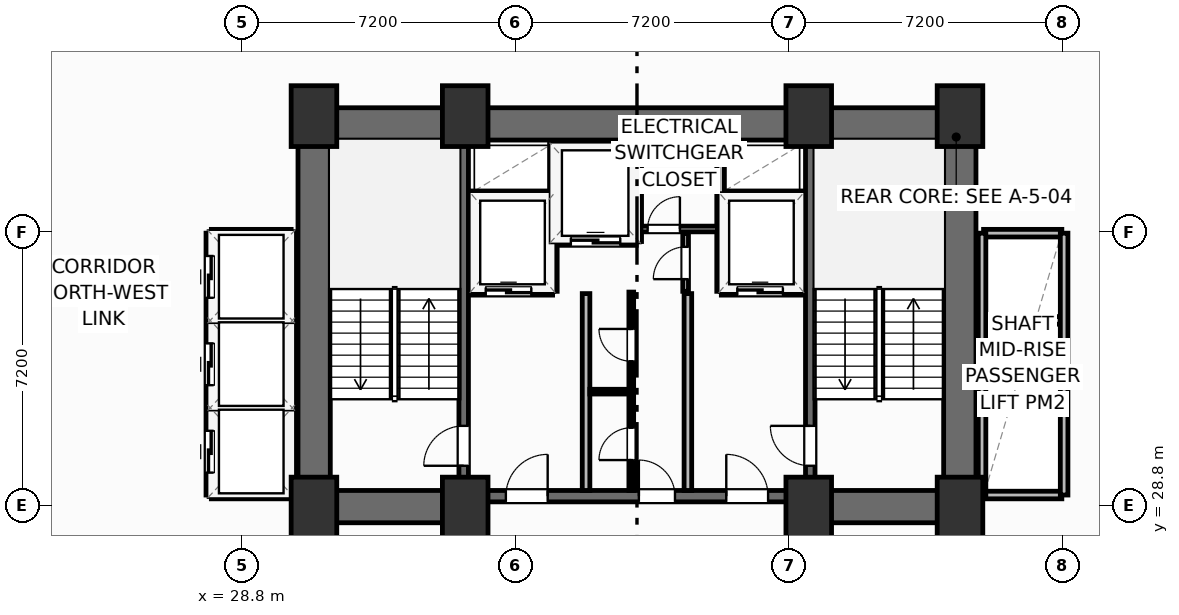
"""IFC4 building model, lengths in metres.
Left out: names, types, materials, properties, quantities, classifications, styles, units other than length and angle.
Written with IfcOpenShell. Run it as: python <this file> out.ifc"""

import sys

from ifc_helpers import new_model, si_unit, direction, frame, frame_2d, origin, origin_2d, place, context, subcontext, project, spatial, rectangle, extrude, element, fill, save


model = new_model("IFC4")
c1 = context("Model", 3, precision=1e-05, world=origin(), true_north=direction((0.0, 1.0)))
c2 = subcontext(c1, "Body", "Model", "MODEL_VIEW")
j1 = project(units=[si_unit("LENGTHUNIT", "METRE"), si_unit("PLANEANGLEUNIT", "RADIAN")], contexts=[c1])
p1 = place(None, origin())
s1 = spatial("IfcSite", under=j1, at=p1, CompositionType="ELEMENT")
p2 = place(p1, origin())
s2 = spatial("IfcBuilding", under=s1, at=p2, CompositionType="ELEMENT")
p3 = place(p2, frame((0.0, 0.0, 60.3)))
s3 = spatial("IfcBuildingStorey", under=s2, at=p3, CompositionType="ELEMENT", Elevation=60.3)
for number, where, z_axis, x_axis in (
    (1, (30.7, 28.75, 0.0), (0.0, 0.0, 1.0), (1.0, 0.0, 0.0)),
    (2, (34.68, 28.75, 0.0), (0.0, 0.0, 1.0), (1.0, 0.0, 0.0)),
    (3, (43.72, 28.75, 0.0), (0.0, 0.0, 1.0), (1.0, 0.0, 0.0)),
    (4, (47.7, 28.75, 0.0), (0.0, 0.0, 1.0), (1.0, 0.0, 0.0)),
    (5, (30.7, 39.05, 0.0), (0.0, 0.0, 1.0), (1.0, 0.0, 0.0)),
    (6, (34.68, 39.05, 0.0), (0.0, 0.0, 1.0), (1.0, 0.0, 0.0)),
    (7, (43.72, 39.05, 0.0), (0.0, 0.0, 1.0), (1.0, 0.0, 0.0)),
    (8, (47.7, 39.05, 0.0), (0.0, 0.0, 1.0), (1.0, 0.0, 0.0)),
):
    element("IfcColumn", number, at=place(p3, frame(where, z_axis=z_axis, x_axis=x_axis)), inside=s3, PredefinedType="COLUMN", context=c2, shape_type="SweptSolid", body=[
        extrude(rectangle(XDim=1.2, YDim=1.6, at=origin_2d()), origin(), (0.0, 0.0, 1.0), 3.7),
    ])
p4 = place(p3, frame((30.28, 38.845, 0.0), z_axis=(0.0, 0.0, 1.0), x_axis=(1.0, 0.0, 0.0)))
e9 = element("IfcWall", 9, at=p4, inside=s3, PredefinedType="SHEAR", context=c2, shape_type="SweptSolid", body=[
    extrude(rectangle(XDim=17.84, YDim=0.85, at=frame_2d((8.92, 0.0))), origin(), (0.0, 0.0, 1.0), 3.45),
])
for number, where, z_axis, x_axis in (
    (10, (30.705, 29.2, 0.0), (0.0, 0.0, 1.0), (0.0, 1.0, 0.0)),
    (11, (47.695, 29.2, 0.0), (0.0, 0.0, 1.0), (0.0, 1.0, 0.0)),
):
    element("IfcWall", number, at=place(p3, frame(where, z_axis=z_axis, x_axis=x_axis)), inside=s3, PredefinedType="SHEAR", context=c2, shape_type="SweptSolid", body=[
        extrude(rectangle(XDim=9.22, YDim=0.85, at=frame_2d((4.61, 0.0))), origin(), (0.0, 0.0, 1.0), 3.45),
    ])
for number, where, z_axis, x_axis in (
    (12, (30.28, 28.775, 0.0), (0.0, 0.0, 1.0), (1.0, 0.0, 0.0)),
    (13, (43.6, 28.775, 0.0), (0.0, 0.0, 1.0), (1.0, 0.0, 0.0)),
):
    element("IfcWall", number, at=place(p3, frame(where, z_axis=z_axis, x_axis=x_axis)), inside=s3, PredefinedType="SHEAR", context=c2, shape_type="SweptSolid", body=[
        extrude(rectangle(XDim=4.52, YDim=0.85, at=frame_2d((2.26, 0.0))), origin(), (0.0, 0.0, 1.0), 3.45),
    ])
p5 = place(p3, frame((34.8, 29.05, 0.0), z_axis=(0.0, 0.0, 1.0), x_axis=(1.0, 0.0, 0.0)))
e14 = element("IfcWall", 14, at=p5, inside=s3, PredefinedType="SHEAR", context=c2, shape_type="SweptSolid", body=[
    extrude(rectangle(XDim=8.8, YDim=0.3, at=frame_2d((4.4, 0.0))), origin(), (0.0, 0.0, 1.0), 3.45),
])
p6 = place(p5, frame((0.95, 0.0, 0.0)))
e15 = element("IfcOpeningElement", 15, at=p6, cuts=e14, PredefinedType="OPENING", context=c2, shape_type="SweptSolid", body=[
    extrude(rectangle(XDim=1.1, YDim=2.15, at=frame_2d((0.55, 1.075))), frame((0.0, 0.16, 0.0), z_axis=(0.0, -1.0, 0.0), x_axis=(1.0, 0.0, 0.0)), (0.0, 0.0, 1.0), 0.32),
])
p7 = place(p5, frame((6.75, 0.0, 0.0)))
e16 = element("IfcOpeningElement", 16, at=p7, cuts=e14, PredefinedType="OPENING", context=c2, shape_type="SweptSolid", body=[
    extrude(rectangle(XDim=1.1, YDim=2.15, at=frame_2d((0.55, 1.075))), frame((0.0, 0.16, 0.0), z_axis=(0.0, -1.0, 0.0), x_axis=(1.0, 0.0, 0.0)), (0.0, 0.0, 1.0), 0.32),
])
p8 = place(p5, frame((4.45, 0.0, 0.0)))
e17 = element("IfcOpeningElement", 17, at=p8, cuts=e14, PredefinedType="OPENING", context=c2, shape_type="SweptSolid", body=[
    extrude(rectangle(XDim=0.95, YDim=2.15, at=frame_2d((0.475, 1.075))), frame((0.0, 0.16, 0.0), z_axis=(0.0, -1.0, 0.0), x_axis=(1.0, 0.0, 0.0)), (0.0, 0.0, 1.0), 0.32),
])
p9 = place(p3, frame((34.64, 29.2, 0.0), z_axis=(0.0, 0.0, 1.0), x_axis=(0.0, 1.0, 0.0)))
e18 = element("IfcWall", 18, at=p9, inside=s3, PredefinedType="SHEAR", context=c2, shape_type="SweptSolid", body=[
    extrude(rectangle(XDim=9.22, YDim=0.25, at=frame_2d((4.61, 0.0))), origin(), (0.0, 0.0, 1.0), 3.45),
])
p10 = place(p9, frame((0.65, 0.0, 0.0)))
e19 = element("IfcOpeningElement", 19, at=p10, cuts=e18, PredefinedType="OPENING", context=c2, shape_type="SweptSolid", body=[
    extrude(rectangle(XDim=1.05, YDim=2.15, at=frame_2d((0.525, 1.075))), frame((0.0, 0.135, 0.0), z_axis=(0.0, -1.0, 0.0), x_axis=(1.0, 0.0, 0.0)), (0.0, 0.0, 1.0), 0.27),
])
p11 = place(p3, frame((43.76, 29.2, 0.0), z_axis=(0.0, 0.0, 1.0), x_axis=(0.0, 1.0, 0.0)))
e20 = element("IfcWall", 20, at=p11, inside=s3, PredefinedType="SHEAR", context=c2, shape_type="SweptSolid", body=[
    extrude(rectangle(XDim=9.22, YDim=0.25, at=frame_2d((4.61, 0.0))), origin(), (0.0, 0.0, 1.0), 3.45),
])
p12 = place(p11, frame((0.65, 0.0, 0.0)))
e21 = element("IfcOpeningElement", 21, at=p12, cuts=e20, PredefinedType="OPENING", context=c2, shape_type="SweptSolid", body=[
    extrude(rectangle(XDim=1.05, YDim=2.15, at=frame_2d((0.525, 1.075))), frame((0.0, 0.135, 0.0), z_axis=(0.0, -1.0, 0.0), x_axis=(1.0, 0.0, 0.0)), (0.0, 0.0, 1.0), 0.27),
])
for number, where, z_axis, x_axis in (
    (22, (37.86, 29.2, 0.0), (0.0, 0.0, 1.0), (0.0, 1.0, 0.0)),
    (23, (40.54, 29.2, 0.0), (0.0, 0.0, 1.0), (0.0, 1.0, 0.0)),
):
    element("IfcWall", number, at=place(p3, frame(where, z_axis=z_axis, x_axis=x_axis)), inside=s3, PredefinedType="PARTITIONING", context=c2, shape_type="SweptSolid", body=[
        extrude(rectangle(XDim=5.18, YDim=0.2, at=frame_2d((2.59, 0.0))), origin(), (0.0, 0.0, 1.0), 3.45),
    ])
p13 = place(p3, frame((34.8, 34.44, 0.0), z_axis=(0.0, 0.0, 1.0), x_axis=(1.0, 0.0, 0.0)))
e24 = element("IfcWall", 24, at=p13, inside=s3, PredefinedType="PARTITIONING", context=c2, shape_type="SweptSolid", body=[
    extrude(rectangle(XDim=2.18, YDim=0.2, at=frame_2d((1.09, 0.0))), origin(), (0.0, 0.0, 1.0), 3.45),
])
p14 = place(p13, frame((0.42, 0.0, 0.0)))
e25 = element("IfcOpeningElement", 25, at=p14, cuts=e24, PredefinedType="OPENING", context=c2, shape_type="SweptSolid", body=[
    extrude(rectangle(XDim=1.2, YDim=2.2, at=frame_2d((0.6, 1.1))), frame((0.0, 0.11, 0.0), z_axis=(0.0, -1.0, 0.0), x_axis=(1.0, 0.0, 0.0)), (0.0, 0.0, 1.0), 0.22),
])
p15 = place(p3, frame((34.8, 36.98, 0.0), z_axis=(0.0, 0.0, 1.0), x_axis=(1.0, 0.0, 0.0)))
e26 = element("IfcWall", 26, at=p15, inside=s3, PredefinedType="PARTITIONING", context=c2, shape_type="SweptSolid", body=[
    extrude(rectangle(XDim=2.18, YDim=0.2, at=frame_2d((1.09, 0.0))), origin(), (0.0, 0.0, 1.0), 3.45),
])
p16 = place(p3, frame((37.0, 34.44, 0.0), z_axis=(0.0, 0.0, 1.0), x_axis=(0.0, 1.0, 0.0)))
e27 = element("IfcWall", 27, at=p16, inside=s3, PredefinedType="PARTITIONING", context=c2, shape_type="SweptSolid", body=[
    extrude(rectangle(XDim=3.9, YDim=0.2, at=frame_2d((1.95, 0.0))), origin(), (0.0, 0.0, 1.0), 3.45),
])
p17 = place(p3, frame((41.42, 34.44, 0.0), z_axis=(0.0, 0.0, 1.0), x_axis=(1.0, 0.0, 0.0)))
e28 = element("IfcWall", 28, at=p17, inside=s3, PredefinedType="PARTITIONING", context=c2, shape_type="SweptSolid", body=[
    extrude(rectangle(XDim=2.18, YDim=0.2, at=frame_2d((1.09, 0.0))), origin(), (0.0, 0.0, 1.0), 3.45),
])
p18 = place(p17, frame((0.42, 0.0, 0.0)))
e29 = element("IfcOpeningElement", 29, at=p18, cuts=e28, PredefinedType="OPENING", context=c2, shape_type="SweptSolid", body=[
    extrude(rectangle(XDim=1.2, YDim=2.2, at=frame_2d((0.6, 1.1))), frame((0.0, 0.11, 0.0), z_axis=(0.0, -1.0, 0.0), x_axis=(1.0, 0.0, 0.0)), (0.0, 0.0, 1.0), 0.22),
])
p19 = place(p3, frame((41.42, 36.98, 0.0), z_axis=(0.0, 0.0, 1.0), x_axis=(1.0, 0.0, 0.0)))
e30 = element("IfcWall", 30, at=p19, inside=s3, PredefinedType="PARTITIONING", context=c2, shape_type="SweptSolid", body=[
    extrude(rectangle(XDim=2.18, YDim=0.2, at=frame_2d((1.09, 0.0))), origin(), (0.0, 0.0, 1.0), 3.45),
])
p20 = place(p3, frame((41.4, 34.44, 0.0), z_axis=(0.0, 0.0, 1.0), x_axis=(0.0, 1.0, 0.0)))
e31 = element("IfcWall", 31, at=p20, inside=s3, PredefinedType="PARTITIONING", context=c2, shape_type="SweptSolid", body=[
    extrude(rectangle(XDim=3.9, YDim=0.2, at=frame_2d((1.95, 0.0))), origin(), (0.0, 0.0, 1.0), 3.45),
])
p21 = place(p3, frame((37.06, 35.75, 0.0), z_axis=(0.0, 0.0, 1.0), x_axis=(1.0, 0.0, 0.0)))
e32 = element("IfcWall", 32, at=p21, inside=s3, PredefinedType="PARTITIONING", context=c2, shape_type="SweptSolid", body=[
    extrude(rectangle(XDim=2.12, YDim=0.2, at=frame_2d((1.06, 0.0))), origin(), (0.0, 0.0, 1.0), 3.45),
])
p22 = place(p21, frame((0.4, 0.0, 0.0)))
e33 = element("IfcOpeningElement", 33, at=p22, cuts=e32, PredefinedType="OPENING", context=c2, shape_type="SweptSolid", body=[
    extrude(rectangle(XDim=1.3, YDim=2.2, at=frame_2d((0.65, 1.1))), frame((0.0, 0.11, 0.0), z_axis=(0.0, -1.0, 0.0), x_axis=(1.0, 0.0, 0.0)), (0.0, 0.0, 1.0), 0.22),
])
p23 = place(p3, frame((39.22, 35.75, 0.0), z_axis=(0.0, 0.0, 1.0), x_axis=(0.0, 1.0, 0.0)))
e34 = element("IfcWall", 34, at=p23, inside=s3, PredefinedType="PARTITIONING", context=c2, shape_type="SweptSolid", body=[
    extrude(rectangle(XDim=2.59, YDim=0.2, at=frame_2d((1.295, 0.0))), origin(), (0.0, 0.0, 1.0), 3.45),
])
p24 = place(p3, frame((39.3, 36.08, 0.0), z_axis=(0.0, 0.0, 1.0), x_axis=(1.0, 0.0, 0.0)))
e35 = element("IfcWall", 35, at=p24, inside=s3, PredefinedType="PARTITIONING", context=c2, shape_type="SweptSolid", body=[
    extrude(rectangle(XDim=2.02, YDim=0.15, at=frame_2d((1.01, 0.0))), origin(), (0.0, 0.0, 1.0), 3.45),
])
p25 = place(p24, frame((0.18, 0.0, 0.0)))
e36 = element("IfcOpeningElement", 36, at=p25, cuts=e35, PredefinedType="OPENING", context=c2, shape_type="SweptSolid", body=[
    extrude(rectangle(XDim=0.85, YDim=2.05, at=frame_2d((0.425, 1.025))), frame((0.0, 0.085, 0.0), z_axis=(0.0, -1.0, 0.0), x_axis=(1.0, 0.0, 0.0)), (0.0, 0.0, 1.0), 0.17),
])
p26 = place(p3, frame((40.48, 34.44, 0.0), z_axis=(0.0, 0.0, 1.0), x_axis=(0.0, 1.0, 0.0)))
e37 = element("IfcWall", 37, at=p26, inside=s3, PredefinedType="PARTITIONING", context=c2, shape_type="SweptSolid", body=[
    extrude(rectangle(XDim=1.52, YDim=0.15, at=frame_2d((0.76, 0.0))), origin(), (0.0, 0.0, 1.0), 3.45),
])
p27 = place(p26, frame((0.32, 0.0, 0.0)))
e38 = element("IfcOpeningElement", 38, at=p27, cuts=e37, PredefinedType="OPENING", context=c2, shape_type="SweptSolid", body=[
    extrude(rectangle(XDim=0.85, YDim=2.05, at=frame_2d((0.425, 1.025))), frame((0.0, 0.085, 0.0), z_axis=(0.0, -1.0, 0.0), x_axis=(1.0, 0.0, 0.0)), (0.0, 0.0, 1.0), 0.17),
])
p28 = place(p3, frame((37.96, 31.8, 0.0), z_axis=(0.0, 0.0, 1.0), x_axis=(1.0, 0.0, 0.0)))
e39 = element("IfcWall", 39, at=p28, inside=s3, PredefinedType="PARTITIONING", context=c2, shape_type="SweptSolid", body=[
    extrude(rectangle(XDim=1.09, YDim=0.125, at=frame_2d((0.545, 0.0))), origin(), (0.0, 0.0, 1.0), 3.45),
])
p29 = place(p3, frame((39.05, 29.2, 0.0), z_axis=(0.0, 0.0, 1.0), x_axis=(0.0, 1.0, 0.0)))
e40 = element("IfcWall", 40, at=p29, inside=s3, PredefinedType="PARTITIONING", context=c2, shape_type="SweptSolid", body=[
    extrude(rectangle(XDim=5.22, YDim=0.125, at=frame_2d((2.61, 0.0))), origin(), (0.0, 0.0, 1.0), 3.45),
])
p30 = place(p29, frame((0.8, 0.0, 0.0)))
e41 = element("IfcOpeningElement", 41, at=p30, cuts=e40, PredefinedType="OPENING", context=c2, shape_type="SweptSolid", body=[
    extrude(rectangle(XDim=0.85, YDim=2.05, at=frame_2d((0.425, 1.025))), frame((0.0, 0.073, 0.0), z_axis=(0.0, -1.0, 0.0), x_axis=(1.0, 0.0, 0.0)), (0.0, 0.0, 1.0), 0.145),
])
p31 = place(p29, frame((3.4, 0.0, 0.0)))
e42 = element("IfcOpeningElement", 42, at=p31, cuts=e40, PredefinedType="OPENING", context=c2, shape_type="SweptSolid", body=[
    extrude(rectangle(XDim=0.85, YDim=2.05, at=frame_2d((0.425, 1.025))), frame((0.0, 0.073, 0.0), z_axis=(0.0, -1.0, 0.0), x_axis=(1.0, 0.0, 0.0)), (0.0, 0.0, 1.0), 0.145),
])
for number, where, z_axis, x_axis in (
    (43, (28.02, 31.375, 0.0), (0.0, 0.0, 1.0), (1.0, 0.0, 0.0)),
    (44, (28.02, 33.675, 0.0), (0.0, 0.0, 1.0), (1.0, 0.0, 0.0)),
):
    element("IfcWall", number, at=place(p3, frame(where, z_axis=z_axis, x_axis=x_axis)), inside=s3, PredefinedType="PARTITIONING", context=c2, shape_type="SweptSolid", body=[
        extrude(rectangle(XDim=2.06, YDim=0.2, at=frame_2d((1.03, 0.0))), origin(), (0.0, 0.0, 1.0), 3.45),
    ])
for number, where, z_axis, x_axis in (
    (45, (28.0, 29.08, 0.0), (0.0, 0.0, 1.0), (1.0, 0.0, 0.0)),
    (46, (28.0, 35.97, 0.0), (0.0, 0.0, 1.0), (1.0, 0.0, 0.0)),
):
    element("IfcWall", number, at=place(p3, frame(where, z_axis=z_axis, x_axis=x_axis)), inside=s3, PredefinedType="PARTITIONING", context=c2, shape_type="SweptSolid", body=[
        extrude(rectangle(XDim=2.1, YDim=0.2, at=frame_2d((1.05, 0.0))), origin(), (0.0, 0.0, 1.0), 3.45),
    ])
p32 = place(p3, frame((30.12, 29.08, 0.0), z_axis=(0.0, 0.0, 1.0), x_axis=(0.0, 1.0, 0.0)))
e47 = element("IfcWall", 47, at=p32, inside=s3, PredefinedType="PARTITIONING", context=c2, shape_type="SweptSolid", body=[
    extrude(rectangle(XDim=6.89, YDim=0.2, at=frame_2d((3.445, 0.0))), origin(), (0.0, 0.0, 1.0), 3.45),
])
p33 = place(p3, frame((27.96, 29.08, 0.0), z_axis=(0.0, 0.0, 1.0), x_axis=(0.0, 1.0, 0.0)))
e48 = element("IfcWall", 48, at=p33, inside=s3, PredefinedType="PARTITIONING", context=c2, shape_type="SweptSolid", body=[
    extrude(rectangle(XDim=6.89, YDim=0.2, at=frame_2d((3.445, 0.0))), origin(), (0.0, 0.0, 1.0), 3.45),
])
p34 = place(p33, frame((0.59, 0.0, 0.0)))
e49 = element("IfcOpeningElement", 49, at=p34, cuts=e48, PredefinedType="OPENING", context=c2, shape_type="SweptSolid", body=[
    extrude(rectangle(XDim=1.1, YDim=2.15, at=frame_2d((0.55, 1.075))), frame((0.0, 0.11, 0.0), z_axis=(0.0, -1.0, 0.0), x_axis=(1.0, 0.0, 0.0)), (0.0, 0.0, 1.0), 0.22),
])
p35 = place(p33, frame((2.89, 0.0, 0.0)))
e50 = element("IfcOpeningElement", 50, at=p35, cuts=e48, PredefinedType="OPENING", context=c2, shape_type="SweptSolid", body=[
    extrude(rectangle(XDim=1.1, YDim=2.15, at=frame_2d((0.55, 1.075))), frame((0.0, 0.11, 0.0), z_axis=(0.0, -1.0, 0.0), x_axis=(1.0, 0.0, 0.0)), (0.0, 0.0, 1.0), 0.22),
])
p36 = place(p33, frame((5.19, 0.0, 0.0)))
e51 = element("IfcOpeningElement", 51, at=p36, cuts=e48, PredefinedType="OPENING", context=c2, shape_type="SweptSolid", body=[
    extrude(rectangle(XDim=1.1, YDim=2.15, at=frame_2d((0.55, 1.075))), frame((0.0, 0.11, 0.0), z_axis=(0.0, -1.0, 0.0), x_axis=(1.0, 0.0, 0.0)), (0.0, 0.0, 1.0), 0.22),
])
for number, where, z_axis, x_axis in (
    (52, (48.32, 31.375, 0.0), (0.0, 0.0, 1.0), (1.0, 0.0, 0.0)),
    (53, (48.32, 33.675, 0.0), (0.0, 0.0, 1.0), (1.0, 0.0, 0.0)),
):
    element("IfcWall", number, at=place(p3, frame(where, z_axis=z_axis, x_axis=x_axis)), inside=s3, PredefinedType="PARTITIONING", context=c2, shape_type="SweptSolid", body=[
        extrude(rectangle(XDim=2.06, YDim=0.2, at=frame_2d((1.03, 0.0))), origin(), (0.0, 0.0, 1.0), 3.45),
    ])
p37 = place(p3, frame((48.32, 29.08, 0.0), z_axis=(0.0, 0.0, 1.0), x_axis=(1.0, 0.0, 0.0)))
e54 = element("IfcWall", 54, at=p37, inside=s3, PredefinedType="PARTITIONING", context=c2, shape_type="SweptSolid", body=[
    extrude(rectangle(XDim=2.06, YDim=0.2, at=frame_2d((1.03, 0.0))), origin(), (0.0, 0.0, 1.0), 2.662),
])
p38 = place(p3, frame((48.32, 35.97, 0.0), z_axis=(0.0, 0.0, 1.0), x_axis=(1.0, 0.0, 0.0)))
e55 = element("IfcWall", 55, at=p38, inside=s3, PredefinedType="PARTITIONING", context=c2, shape_type="SweptSolid", body=[
    extrude(rectangle(XDim=2.06, YDim=0.2, at=frame_2d((1.03, 0.0))), origin(), (0.0, 0.0, 1.0), 3.45),
])
for number, where, z_axis, x_axis in (
    (56, (48.28, 29.08, 0.0), (0.0, 0.0, 1.0), (0.0, 1.0, 0.0)),
    (57, (50.44, 29.08, 0.0), (0.0, 0.0, 1.0), (0.0, 1.0, 0.0)),
):
    element("IfcWall", number, at=place(p3, frame(where, z_axis=z_axis, x_axis=x_axis)), inside=s3, PredefinedType="PARTITIONING", context=c2, shape_type="SweptSolid", body=[
        extrude(rectangle(XDim=6.89, YDim=0.2, at=frame_2d((3.445, 0.0))), origin(), (0.0, 0.0, 1.0), 3.45),
    ])
p39 = place(p10, origin())
e58 = element("IfcDoor", 58, at=p39, inside=s3, OperationType="SINGLE_SWING_LEFT", PredefinedType="DOOR", context=c2, shape_type="SweptSolid", body=[
    extrude(rectangle(XDim=1.05, YDim=2.15, at=frame_2d((0.525, 1.075))), frame((0.0, 0.025, 0.0), z_axis=(0.0, -1.0, 0.0), x_axis=(1.0, 0.0, 0.0)), (0.0, 0.0, 1.0), 0.05),
])
fill(e19, e58)
p40 = place(p12, origin())
e59 = element("IfcDoor", 59, at=p40, inside=s3, OperationType="SINGLE_SWING_RIGHT", PredefinedType="DOOR", context=c2, shape_type="SweptSolid", body=[
    extrude(rectangle(XDim=1.05, YDim=2.15, at=frame_2d((0.525, 1.075))), frame((0.0, 0.025, 0.0), z_axis=(0.0, -1.0, 0.0), x_axis=(1.0, 0.0, 0.0)), (0.0, 0.0, 1.0), 0.05),
])
fill(e21, e59)
p41 = place(p6, origin())
e60 = element("IfcDoor", 60, at=p41, inside=s3, OperationType="SINGLE_SWING_RIGHT", PredefinedType="DOOR", context=c2, shape_type="SweptSolid", body=[
    extrude(rectangle(XDim=1.1, YDim=2.15, at=frame_2d((0.55, 1.075))), frame((0.0, 0.025, 0.0), z_axis=(0.0, -1.0, 0.0), x_axis=(1.0, 0.0, 0.0)), (0.0, 0.0, 1.0), 0.05),
])
fill(e15, e60)
p42 = place(p7, origin())
e61 = element("IfcDoor", 61, at=p42, inside=s3, OperationType="SINGLE_SWING_LEFT", PredefinedType="DOOR", context=c2, shape_type="SweptSolid", body=[
    extrude(rectangle(XDim=1.1, YDim=2.15, at=frame_2d((0.55, 1.075))), frame((0.0, 0.025, 0.0), z_axis=(0.0, -1.0, 0.0), x_axis=(1.0, 0.0, 0.0)), (0.0, 0.0, 1.0), 0.05),
])
fill(e16, e61)
p43 = place(p14, origin())
e62 = element("IfcDoor", 62, at=p43, inside=s3, OperationType="SLIDING_TO_LEFT", PredefinedType="DOOR", context=c2, shape_type="SweptSolid", body=[
    extrude(rectangle(XDim=1.2, YDim=2.2, at=frame_2d((0.6, 1.1))), frame((0.0, 0.025, 0.0), z_axis=(0.0, -1.0, 0.0), x_axis=(1.0, 0.0, 0.0)), (0.0, 0.0, 1.0), 0.05),
])
fill(e25, e62)
p44 = place(p18, origin())
e63 = element("IfcDoor", 63, at=p44, inside=s3, OperationType="SLIDING_TO_LEFT", PredefinedType="DOOR", context=c2, shape_type="SweptSolid", body=[
    extrude(rectangle(XDim=1.2, YDim=2.2, at=frame_2d((0.6, 1.1))), frame((0.0, 0.025, 0.0), z_axis=(0.0, -1.0, 0.0), x_axis=(1.0, 0.0, 0.0)), (0.0, 0.0, 1.0), 0.05),
])
fill(e29, e63)
p45 = place(p22, origin())
e64 = element("IfcDoor", 64, at=p45, inside=s3, OperationType="SLIDING_TO_LEFT", PredefinedType="DOOR", context=c2, shape_type="SweptSolid", body=[
    extrude(rectangle(XDim=1.3, YDim=2.2, at=frame_2d((0.65, 1.1))), frame((0.0, 0.025, 0.0), z_axis=(0.0, -1.0, 0.0), x_axis=(1.0, 0.0, 0.0)), (0.0, 0.0, 1.0), 0.05),
])
fill(e33, e64)
p46 = place(p25, origin())
e65 = element("IfcDoor", 65, at=p46, inside=s3, OperationType="SINGLE_SWING_RIGHT", PredefinedType="DOOR", context=c2, shape_type="SweptSolid", body=[
    extrude(rectangle(XDim=0.85, YDim=2.05, at=frame_2d((0.425, 1.025))), frame((0.0, 0.025, 0.0), z_axis=(0.0, -1.0, 0.0), x_axis=(1.0, 0.0, 0.0)), (0.0, 0.0, 1.0), 0.05),
])
fill(e36, e65)
p47 = place(p27, origin())
e66 = element("IfcDoor", 66, at=p47, inside=s3, OperationType="SINGLE_SWING_LEFT", PredefinedType="DOOR", context=c2, shape_type="SweptSolid", body=[
    extrude(rectangle(XDim=0.85, YDim=2.05, at=frame_2d((0.425, 1.025))), frame((0.0, 0.025, 0.0), z_axis=(0.0, -1.0, 0.0), x_axis=(1.0, 0.0, 0.0)), (0.0, 0.0, 1.0), 0.05),
])
fill(e38, e66)
p48 = place(p30, origin())
e67 = element("IfcDoor", 67, at=p48, inside=s3, OperationType="SINGLE_SWING_LEFT", PredefinedType="DOOR", context=c2, shape_type="SweptSolid", body=[
    extrude(rectangle(XDim=0.85, YDim=2.05, at=frame_2d((0.425, 1.025))), frame((0.0, 0.025, 0.0), z_axis=(0.0, -1.0, 0.0), x_axis=(1.0, 0.0, 0.0)), (0.0, 0.0, 1.0), 0.05),
])
fill(e41, e67)
p49 = place(p31, origin())
e68 = element("IfcDoor", 68, at=p49, inside=s3, OperationType="SINGLE_SWING_RIGHT", PredefinedType="DOOR", context=c2, shape_type="SweptSolid", body=[
    extrude(rectangle(XDim=0.85, YDim=2.05, at=frame_2d((0.425, 1.025))), frame((0.0, 0.025, 0.0), z_axis=(0.0, -1.0, 0.0), x_axis=(1.0, 0.0, 0.0)), (0.0, 0.0, 1.0), 0.05),
])
fill(e42, e68)
p50 = place(p8, origin())
e69 = element("IfcDoor", 69, at=p50, inside=s3, OperationType="SINGLE_SWING_LEFT", PredefinedType="DOOR", context=c2, shape_type="SweptSolid", body=[
    extrude(rectangle(XDim=0.95, YDim=2.15, at=frame_2d((0.475, 1.075))), frame((0.0, 0.025, 0.0), z_axis=(0.0, -1.0, 0.0), x_axis=(1.0, 0.0, 0.0)), (0.0, 0.0, 1.0), 0.05),
])
fill(e17, e69)
p51 = place(p34, origin())
e70 = element("IfcDoor", 70, at=p51, inside=s3, OperationType="SLIDING_TO_LEFT", PredefinedType="DOOR", context=c2, shape_type="SweptSolid", body=[
    extrude(rectangle(XDim=1.1, YDim=2.15, at=frame_2d((0.55, 1.075))), frame((0.0, 0.025, 0.0), z_axis=(0.0, -1.0, 0.0), x_axis=(1.0, 0.0, 0.0)), (0.0, 0.0, 1.0), 0.05),
])
fill(e49, e70)
p52 = place(p35, origin())
e71 = element("IfcDoor", 71, at=p52, inside=s3, OperationType="SLIDING_TO_LEFT", PredefinedType="DOOR", context=c2, shape_type="SweptSolid", body=[
    extrude(rectangle(XDim=1.1, YDim=2.15, at=frame_2d((0.55, 1.075))), frame((0.0, 0.025, 0.0), z_axis=(0.0, -1.0, 0.0), x_axis=(1.0, 0.0, 0.0)), (0.0, 0.0, 1.0), 0.05),
])
fill(e50, e71)
p53 = place(p36, origin())
e72 = element("IfcDoor", 72, at=p53, inside=s3, OperationType="SLIDING_TO_LEFT", PredefinedType="DOOR", context=c2, shape_type="SweptSolid", body=[
    extrude(rectangle(XDim=1.1, YDim=2.15, at=frame_2d((0.55, 1.075))), frame((0.0, 0.025, 0.0), z_axis=(0.0, -1.0, 0.0), x_axis=(1.0, 0.0, 0.0)), (0.0, 0.0, 1.0), 0.05),
])
fill(e51, e72)
save(model, sys.argv[1])
